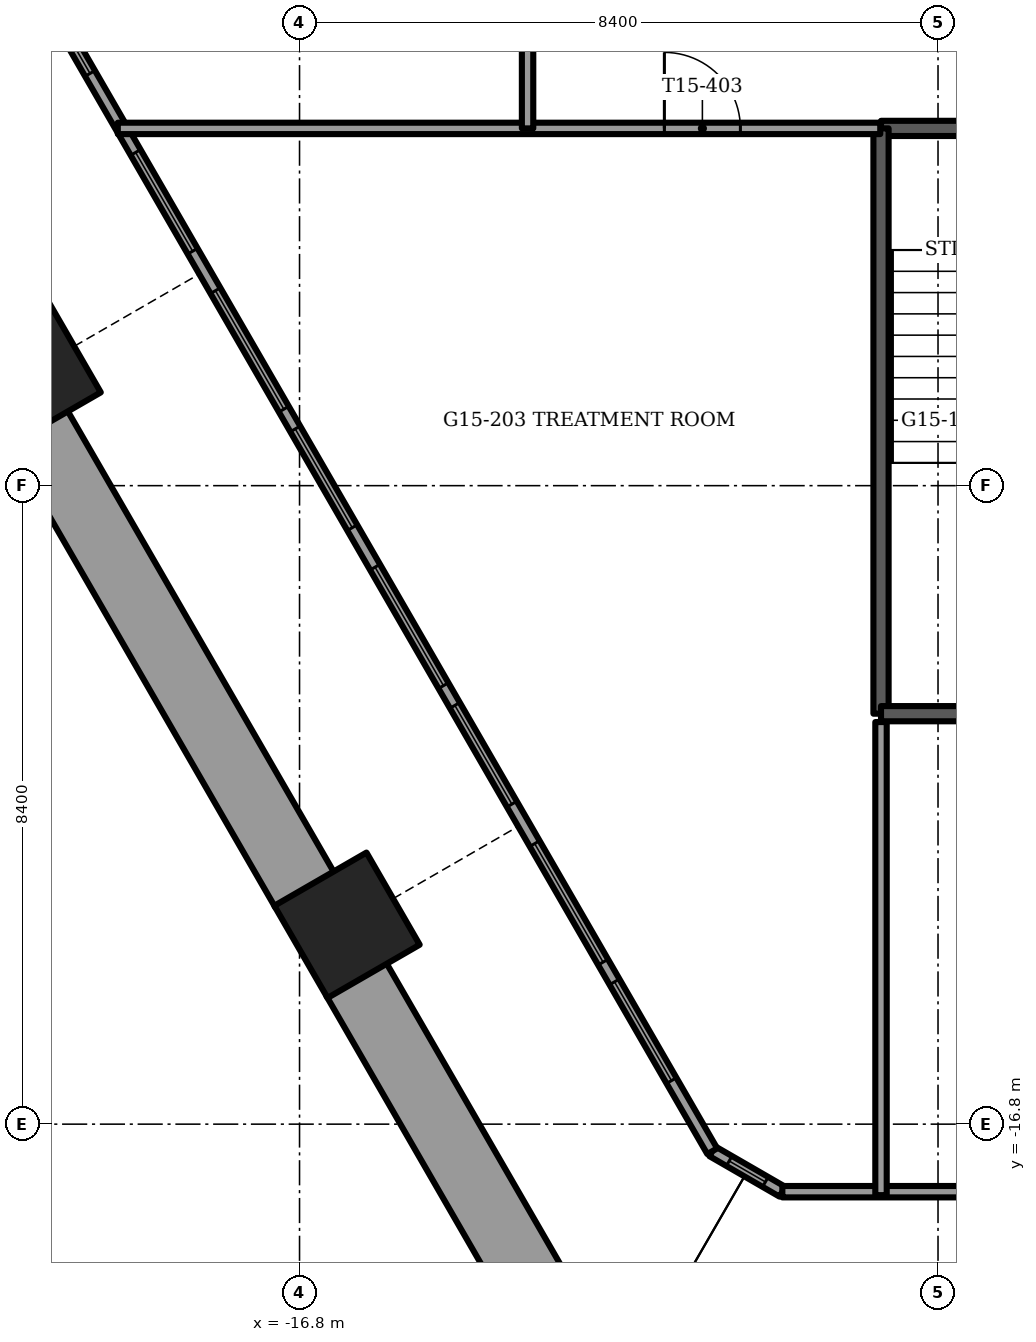
"""IFC4 building model, lengths in metres.
Left out: names, types, materials, properties, quantities, classifications, styles, units other than length and angle.
Written with IfcOpenShell. Run it as: python <this file> out.ifc"""

import sys

from ifc_helpers import new_model, si_unit, direction, frame, frame_2d, origin, origin_2d, place, context, subcontext, project, spatial, rectangle, extrude, element, fill, save


model = new_model("IFC4")
c1 = context("Model", 3, precision=1e-05, world=origin(), true_north=direction((0.0, 1.0)))
c2 = subcontext(c1, "Body", "Model", "MODEL_VIEW")
j1 = project(units=[si_unit("LENGTHUNIT", "METRE"), si_unit("PLANEANGLEUNIT", "RADIAN")], contexts=[c1])
p1 = place(None, origin())
s1 = spatial("IfcSite", under=j1, at=p1, CompositionType="ELEMENT")
p2 = place(p1, origin())
s2 = spatial("IfcBuilding", under=s1, at=p2, CompositionType="ELEMENT")
p3 = place(p2, frame((0.0, 0.0, 61.75)))
s3 = spatial("IfcBuildingStorey", under=s2, at=p3, CompositionType="ELEMENT", Elevation=61.75)
for number, where, z_axis, x_axis in (
    (1, (-20.371, -6.917, -1.2), (0.0, 0.0, 1.0), (-0.5, 0.866, 0.0)),
    (2, (-16.175, -14.183, -1.2), (0.0, 0.0, 1.0), (-0.5, 0.866, 0.0)),
):
    element("IfcColumn", number, at=place(p3, frame(where, z_axis=z_axis, x_axis=x_axis)), inside=s3, PredefinedType="COLUMN", context=c2, shape_type="SweptSolid", body=[
        extrude(rectangle(XDim=1.4, YDim=1.4, at=origin_2d()), origin(), (0.0, 0.0, 1.0), 3.75),
    ])
p4 = place(p3, frame((-20.252, -7.622, 0.0), z_axis=(0.0, 0.0, 1.0), x_axis=(0.499997206141, -0.866027016814, 0.0)))
e3 = element("IfcWall", 3, at=p4, inside=s3, PredefinedType="PARAPET", context=c2, shape_type="SweptSolid", body=[
    extrude(rectangle(XDim=7.051, YDim=0.9, at=frame_2d((3.525, 0.0))), origin(), (0.0, 0.0, 1.0), 1.1),
])
p5 = place(p3, frame((-16.057, -14.889, 0.0), z_axis=(0.0, 0.0, 1.0), x_axis=(0.500001680296, -0.866024433663, 0.0)))
e4 = element("IfcWall", 4, at=p5, inside=s3, PredefinedType="PARAPET", context=c2, shape_type="SweptSolid", body=[
    extrude(rectangle(XDim=5.853, YDim=0.9, at=frame_2d((2.927, 0.0))), origin(), (0.0, 0.0, 1.0), 1.1),
])
p6 = place(p3, frame((-20.543, -1.269, 0.0), z_axis=(0.0, 0.0, 1.0), x_axis=(0.499995095024, -0.866028235655, 0.0)))
e5 = element("IfcWall", 5, at=p6, inside=s3, PredefinedType="SOLIDWALL", context=c2, shape_type="SweptSolid", body=[
    extrude(rectangle(XDim=18.345, YDim=0.15, at=frame_2d((9.172, 0.0))), origin(), (0.0, 0.0, 1.0), 3.45),
])
p7 = place(p6, frame((1.073, 0.0, 0.15)))
e6 = element("IfcOpeningElement", 6, at=p7, cuts=e5, PredefinedType="OPENING", context=c2, shape_type="SweptSolid", body=[
    extrude(rectangle(XDim=0.9, YDim=2.85, at=frame_2d((0.45, 1.425))), frame((0.0, 0.075, 0.0), z_axis=(0.0, -1.0, 0.0), x_axis=(1.0, 0.0, 0.0)), (0.0, 0.0, 1.0), 0.15),
])
p8 = place(p6, frame((3.172, 0.0, 0.15)))
e7 = element("IfcOpeningElement", 7, at=p8, cuts=e5, PredefinedType="OPENING", context=c2, shape_type="SweptSolid", body=[
    extrude(rectangle(XDim=1.5, YDim=2.85, at=frame_2d((0.75, 1.425))), frame((0.0, 0.075, 0.0), z_axis=(0.0, -1.0, 0.0), x_axis=(1.0, 0.0, 0.0)), (0.0, 0.0, 1.0), 0.15),
])
p9 = place(p6, frame((5.272, 0.0, 0.15)))
e8 = element("IfcOpeningElement", 8, at=p9, cuts=e5, PredefinedType="OPENING", context=c2, shape_type="SweptSolid", body=[
    extrude(rectangle(XDim=1.8, YDim=2.85, at=frame_2d((0.9, 1.425))), frame((0.0, 0.075, 0.0), z_axis=(0.0, -1.0, 0.0), x_axis=(1.0, 0.0, 0.0)), (0.0, 0.0, 1.0), 0.15),
])
p10 = place(p6, frame((7.372, 0.0, 0.15)))
e9 = element("IfcOpeningElement", 9, at=p10, cuts=e5, PredefinedType="OPENING", context=c2, shape_type="SweptSolid", body=[
    extrude(rectangle(XDim=1.5, YDim=2.85, at=frame_2d((0.75, 1.425))), frame((0.0, 0.075, 0.0), z_axis=(0.0, -1.0, 0.0), x_axis=(1.0, 0.0, 0.0)), (0.0, 0.0, 1.0), 0.15),
])
p11 = place(p6, frame((9.472, 0.0, 0.15)))
e10 = element("IfcOpeningElement", 10, at=p11, cuts=e5, PredefinedType="OPENING", context=c2, shape_type="SweptSolid", body=[
    extrude(rectangle(XDim=1.8, YDim=2.85, at=frame_2d((0.9, 1.425))), frame((0.0, 0.075, 0.0), z_axis=(0.0, -1.0, 0.0), x_axis=(1.0, 0.0, 0.0)), (0.0, 0.0, 1.0), 0.15),
])
p12 = place(p6, frame((11.573, 0.0, 0.15)))
e11 = element("IfcOpeningElement", 11, at=p12, cuts=e5, PredefinedType="OPENING", context=c2, shape_type="SweptSolid", body=[
    extrude(rectangle(XDim=1.5, YDim=2.85, at=frame_2d((0.75, 1.425))), frame((0.0, 0.075, 0.0), z_axis=(0.0, -1.0, 0.0), x_axis=(1.0, 0.0, 0.0)), (0.0, 0.0, 1.0), 0.15),
])
p13 = place(p6, frame((13.672, 0.0, 0.15)))
e12 = element("IfcOpeningElement", 12, at=p13, cuts=e5, PredefinedType="OPENING", context=c2, shape_type="SweptSolid", body=[
    extrude(rectangle(XDim=1.8, YDim=2.85, at=frame_2d((0.9, 1.425))), frame((0.0, 0.075, 0.0), z_axis=(0.0, -1.0, 0.0), x_axis=(1.0, 0.0, 0.0)), (0.0, 0.0, 1.0), 0.15),
])
p14 = place(p6, frame((15.772, 0.0, 0.15)))
e13 = element("IfcOpeningElement", 13, at=p14, cuts=e5, PredefinedType="OPENING", context=c2, shape_type="SweptSolid", body=[
    extrude(rectangle(XDim=1.5, YDim=2.85, at=frame_2d((0.75, 1.425))), frame((0.0, 0.075, 0.0), z_axis=(0.0, -1.0, 0.0), x_axis=(1.0, 0.0, 0.0)), (0.0, 0.0, 1.0), 0.15),
])
p15 = place(p3, frame((-10.448, -17.689, 0.0), z_axis=(0.0, 0.0, 1.0), x_axis=(1.0, 0.0, 0.0)))
e14 = element("IfcWall", 14, at=p15, inside=s3, PredefinedType="SOLIDWALL", context=c2, shape_type="SweptSolid", body=[
    extrude(rectangle(XDim=20.896, YDim=0.15, at=frame_2d((10.448, 0.0))), origin(), (0.0, 0.0, 1.0), 3.45),
])
p16 = place(p15, frame((2.348, 0.0, 0.15)))
e15 = element("IfcOpeningElement", 15, at=p16, cuts=e14, PredefinedType="OPENING", context=c2, shape_type="SweptSolid", body=[
    extrude(rectangle(XDim=1.8, YDim=2.85, at=frame_2d((0.9, 1.425))), frame((0.0, 0.075, 0.0), z_axis=(0.0, -1.0, 0.0), x_axis=(1.0, 0.0, 0.0)), (0.0, 0.0, 1.0), 0.15),
])
p17 = place(p15, frame((6.598, 0.0, 0.15)))
e16 = element("IfcOpeningElement", 16, at=p17, cuts=e14, PredefinedType="OPENING", context=c2, shape_type="SweptSolid", body=[
    extrude(rectangle(XDim=0.9, YDim=2.85, at=frame_2d((0.45, 1.425))), frame((0.0, 0.075, 0.0), z_axis=(0.0, -1.0, 0.0), x_axis=(1.0, 0.0, 0.0)), (0.0, 0.0, 1.0), 0.15),
])
p18 = place(p15, frame((8.048, 0.0, 0.0)))
e17 = element("IfcOpeningElement", 17, at=p18, cuts=e14, PredefinedType="OPENING", context=c2, shape_type="SweptSolid", body=[
    extrude(rectangle(XDim=1.5, YDim=2.4, at=frame_2d((0.75, 1.2))), frame((0.0, 0.075, 0.0), z_axis=(0.0, -1.0, 0.0), x_axis=(1.0, 0.0, 0.0)), (0.0, 0.0, 1.0), 0.15),
])
p19 = place(p15, frame((10.798, 0.0, 0.15)))
e18 = element("IfcOpeningElement", 18, at=p19, cuts=e14, PredefinedType="OPENING", context=c2, shape_type="SweptSolid", body=[
    extrude(rectangle(XDim=1.8, YDim=2.85, at=frame_2d((0.9, 1.425))), frame((0.0, 0.075, 0.0), z_axis=(0.0, -1.0, 0.0), x_axis=(1.0, 0.0, 0.0)), (0.0, 0.0, 1.0), 0.15),
])
p20 = place(p15, frame((12.848, 0.0, 0.0)))
e19 = element("IfcOpeningElement", 19, at=p20, cuts=e14, PredefinedType="OPENING", context=c2, shape_type="SweptSolid", body=[
    extrude(rectangle(XDim=1.5, YDim=2.4, at=frame_2d((0.75, 1.2))), frame((0.0, 0.075, 0.0), z_axis=(0.0, -1.0, 0.0), x_axis=(1.0, 0.0, 0.0)), (0.0, 0.0, 1.0), 0.15),
])
p21 = place(p15, frame((16.598, 0.0, 0.15)))
e20 = element("IfcOpeningElement", 20, at=p21, cuts=e14, PredefinedType="OPENING", context=c2, shape_type="SweptSolid", body=[
    extrude(rectangle(XDim=1.8, YDim=2.85, at=frame_2d((0.9, 1.425))), frame((0.0, 0.075, 0.0), z_axis=(0.0, -1.0, 0.0), x_axis=(1.0, 0.0, 0.0)), (0.0, 0.0, 1.0), 0.15),
])
p22 = place(p3, frame((-11.37, -17.156, 0.0), z_axis=(0.0, 0.0, 1.0), x_axis=(0.865948903286, -0.500132479346, 0.0)))
e21 = element("IfcWall", 21, at=p22, inside=s3, PredefinedType="SOLIDWALL", context=c2, shape_type="SweptSolid", body=[
    extrude(rectangle(XDim=1.065, YDim=0.15, at=frame_2d((0.533, 0.0))), origin(), (0.0, 0.0, 1.0), 3.45),
])
p23 = place(p22, frame((0.258, 0.0, 0.15)))
e22 = element("IfcOpeningElement", 22, at=p23, cuts=e21, PredefinedType="OPENING", context=c2, shape_type="SweptSolid", body=[
    extrude(rectangle(XDim=0.55, YDim=2.85, at=frame_2d((0.275, 1.425))), frame((0.0, 0.075, 0.0), z_axis=(0.0, -1.0, 0.0), x_axis=(1.0, 0.0, 0.0)), (0.0, 0.0, 1.0), 0.15),
])
p24 = place(p3, frame((-9.15, -3.7, -0.3), z_axis=(0.0, 0.0, 1.0), x_axis=(1.0, 0.0, 0.0)))
e23 = element("IfcWall", 23, at=p24, inside=s3, PredefinedType="SOLIDWALL", context=c2, shape_type="SweptSolid", body=[
    extrude(rectangle(XDim=3.35, YDim=0.2, at=frame_2d((1.675, 0.0))), origin(), (0.0, 0.0, 1.0), 3.75),
])
p25 = place(p24, frame((1.125, 0.0, 0.0)))
e24 = element("IfcOpeningElement", 24, at=p25, cuts=e23, PredefinedType="OPENING", context=c2, shape_type="SweptSolid", body=[
    extrude(rectangle(XDim=1.1, YDim=2.1, at=frame_2d((0.55, 1.05))), frame((0.0, 0.1, 0.0), z_axis=(0.0, -1.0, 0.0), x_axis=(1.0, 0.0, 0.0)), (0.0, 0.0, 1.0), 0.2),
])
p26 = place(p3, frame((-9.15, -3.7, -0.3), z_axis=(0.0, 0.0, 1.0), x_axis=(0.0, -1.0, 0.0)))
e25 = element("IfcWall", 25, at=p26, inside=s3, PredefinedType="SOLIDWALL", context=c2, shape_type="SweptSolid", body=[
    extrude(rectangle(XDim=7.7, YDim=0.2, at=frame_2d((3.85, 0.0))), origin(), (0.0, 0.0, 1.0), 3.75),
])
p27 = place(p3, frame((-9.15, -11.4, -0.3), z_axis=(0.0, 0.0, 1.0), x_axis=(1.0, 0.0, 0.0)))
e26 = element("IfcWall", 26, at=p27, inside=s3, PredefinedType="SOLIDWALL", context=c2, shape_type="SweptSolid", body=[
    extrude(rectangle(XDim=3.35, YDim=0.2, at=frame_2d((1.675, 0.0))), origin(), (0.0, 0.0, 1.0), 3.75),
])
p28 = place(p3, frame((-19.191, -3.7, 0.0), z_axis=(0.0, 0.0, 1.0), x_axis=(1.0, 0.0, 0.0)))
e27 = element("IfcWall", 27, at=p28, inside=s3, PredefinedType="PARTITIONING", context=c2, shape_type="SweptSolid", body=[
    extrude(rectangle(XDim=10.031, YDim=0.15, at=frame_2d((5.016, 0.0))), origin(), (0.0, 0.0, 1.0), 3.45),
])
p29 = place(p28, frame((7.191, 0.0, 0.0)))
e28 = element("IfcOpeningElement", 28, at=p29, cuts=e27, PredefinedType="OPENING", context=c2, shape_type="SweptSolid", body=[
    extrude(rectangle(XDim=1.0, YDim=2.1, at=frame_2d((0.5, 1.05))), frame((0.0, 0.075, 0.0), z_axis=(0.0, -1.0, 0.0), x_axis=(1.0, 0.0, 0.0)), (0.0, 0.0, 1.0), 0.15),
])
p30 = place(p3, frame((-9.15, -17.734, 0.0), z_axis=(0.0, 0.0, 1.0), x_axis=(0.0, 1.0, 0.0)))
e29 = element("IfcWall", 29, at=p30, inside=s3, PredefinedType="PARTITIONING", context=c2, shape_type="SweptSolid", body=[
    extrude(rectangle(XDim=6.224, YDim=0.15, at=frame_2d((3.112, 0.0))), origin(), (0.0, 0.0, 1.0), 3.45),
])
p31 = place(p3, frame((-13.8, -3.7, 0.0), z_axis=(0.0, 0.0, 1.0), x_axis=(0.0, 1.0, 0.0)))
e30 = element("IfcWall", 30, at=p31, inside=s3, PredefinedType="PARTITIONING", context=c2, shape_type="SweptSolid", body=[
    extrude(rectangle(XDim=15.265, YDim=0.15, at=frame_2d((7.632, 0.0))), origin(), (0.0, 0.0, 1.0), 3.45),
])
p32 = place(p31, frame((4.263, 0.0, 0.0)))
e31 = element("IfcOpeningElement", 31, at=p32, cuts=e30, PredefinedType="OPENING", context=c2, shape_type="SweptSolid", body=[
    extrude(rectangle(XDim=1.0, YDim=2.1, at=frame_2d((0.5, 1.05))), frame((0.0, 0.075, 0.0), z_axis=(0.0, -1.0, 0.0), x_axis=(1.0, 0.0, 0.0)), (0.0, 0.0, 1.0), 0.15),
])
p33 = place(p31, frame((11.212, 0.0, 0.0)))
e32 = element("IfcOpeningElement", 32, at=p33, cuts=e30, PredefinedType="OPENING", context=c2, shape_type="SweptSolid", body=[
    extrude(rectangle(XDim=1.0, YDim=2.1, at=frame_2d((0.5, 1.05))), frame((0.0, 0.075, 0.0), z_axis=(0.0, -1.0, 0.0), x_axis=(1.0, 0.0, 0.0)), (0.0, 0.0, 1.0), 0.15),
])
p34 = place(p7, origin())
e33 = element("IfcWindow", 33, at=p34, inside=s3, PartitioningType="SINGLE_PANEL", PredefinedType="WINDOW", context=c2, shape_type="SweptSolid", body=[
    extrude(rectangle(XDim=0.9, YDim=2.85, at=frame_2d((0.45, 1.425))), frame((0.0, 0.03, 0.0), z_axis=(0.0, -1.0, 0.0), x_axis=(1.0, 0.0, 0.0)), (0.0, 0.0, 1.0), 0.06),
])
fill(e6, e33)
p35 = place(p8, origin())
e34 = element("IfcWindow", 34, at=p35, inside=s3, PartitioningType="SINGLE_PANEL", PredefinedType="WINDOW", context=c2, shape_type="SweptSolid", body=[
    extrude(rectangle(XDim=1.5, YDim=2.85, at=frame_2d((0.75, 1.425))), frame((0.0, 0.03, 0.0), z_axis=(0.0, -1.0, 0.0), x_axis=(1.0, 0.0, 0.0)), (0.0, 0.0, 1.0), 0.06),
])
fill(e7, e34)
p36 = place(p9, origin())
e35 = element("IfcWindow", 35, at=p36, inside=s3, PartitioningType="SINGLE_PANEL", PredefinedType="WINDOW", context=c2, shape_type="SweptSolid", body=[
    extrude(rectangle(XDim=1.8, YDim=2.85, at=frame_2d((0.9, 1.425))), frame((0.0, 0.03, 0.0), z_axis=(0.0, -1.0, 0.0), x_axis=(1.0, 0.0, 0.0)), (0.0, 0.0, 1.0), 0.06),
])
fill(e8, e35)
p37 = place(p10, origin())
e36 = element("IfcWindow", 36, at=p37, inside=s3, PartitioningType="SINGLE_PANEL", PredefinedType="WINDOW", context=c2, shape_type="SweptSolid", body=[
    extrude(rectangle(XDim=1.5, YDim=2.85, at=frame_2d((0.75, 1.425))), frame((0.0, 0.03, 0.0), z_axis=(0.0, -1.0, 0.0), x_axis=(1.0, 0.0, 0.0)), (0.0, 0.0, 1.0), 0.06),
])
fill(e9, e36)
p38 = place(p11, origin())
e37 = element("IfcWindow", 37, at=p38, inside=s3, PartitioningType="SINGLE_PANEL", PredefinedType="WINDOW", context=c2, shape_type="SweptSolid", body=[
    extrude(rectangle(XDim=1.8, YDim=2.85, at=frame_2d((0.9, 1.425))), frame((0.0, 0.03, 0.0), z_axis=(0.0, -1.0, 0.0), x_axis=(1.0, 0.0, 0.0)), (0.0, 0.0, 1.0), 0.06),
])
fill(e10, e37)
p39 = place(p12, origin())
e38 = element("IfcWindow", 38, at=p39, inside=s3, PartitioningType="SINGLE_PANEL", PredefinedType="WINDOW", context=c2, shape_type="SweptSolid", body=[
    extrude(rectangle(XDim=1.5, YDim=2.85, at=frame_2d((0.75, 1.425))), frame((0.0, 0.03, 0.0), z_axis=(0.0, -1.0, 0.0), x_axis=(1.0, 0.0, 0.0)), (0.0, 0.0, 1.0), 0.06),
])
fill(e11, e38)
p40 = place(p13, origin())
e39 = element("IfcWindow", 39, at=p40, inside=s3, PartitioningType="SINGLE_PANEL", PredefinedType="WINDOW", context=c2, shape_type="SweptSolid", body=[
    extrude(rectangle(XDim=1.8, YDim=2.85, at=frame_2d((0.9, 1.425))), frame((0.0, 0.03, 0.0), z_axis=(0.0, -1.0, 0.0), x_axis=(1.0, 0.0, 0.0)), (0.0, 0.0, 1.0), 0.06),
])
fill(e12, e39)
p41 = place(p14, origin())
e40 = element("IfcWindow", 40, at=p41, inside=s3, PartitioningType="SINGLE_PANEL", PredefinedType="WINDOW", context=c2, shape_type="SweptSolid", body=[
    extrude(rectangle(XDim=1.5, YDim=2.85, at=frame_2d((0.75, 1.425))), frame((0.0, 0.03, 0.0), z_axis=(0.0, -1.0, 0.0), x_axis=(1.0, 0.0, 0.0)), (0.0, 0.0, 1.0), 0.06),
])
fill(e13, e40)
p42 = place(p23, origin())
e41 = element("IfcWindow", 41, at=p42, inside=s3, PartitioningType="SINGLE_PANEL", PredefinedType="WINDOW", context=c2, shape_type="SweptSolid", body=[
    extrude(rectangle(XDim=0.55, YDim=2.85, at=frame_2d((0.275, 1.425))), frame((0.0, 0.03, 0.0), z_axis=(0.0, -1.0, 0.0), x_axis=(1.0, 0.0, 0.0)), (0.0, 0.0, 1.0), 0.06),
])
fill(e22, e41)
p43 = place(p29, origin())
e42 = element("IfcDoor", 42, at=p43, inside=s3, OperationType="SINGLE_SWING_LEFT", PredefinedType="DOOR", context=c2, shape_type="SweptSolid", body=[
    extrude(rectangle(XDim=1.0, YDim=2.1, at=frame_2d((0.5, 1.05))), frame((0.0, 0.025, 0.0), z_axis=(0.0, -1.0, 0.0), x_axis=(1.0, 0.0, 0.0)), (0.0, 0.0, 1.0), 0.05),
])
fill(e28, e42)
save(model, sys.argv[1])
